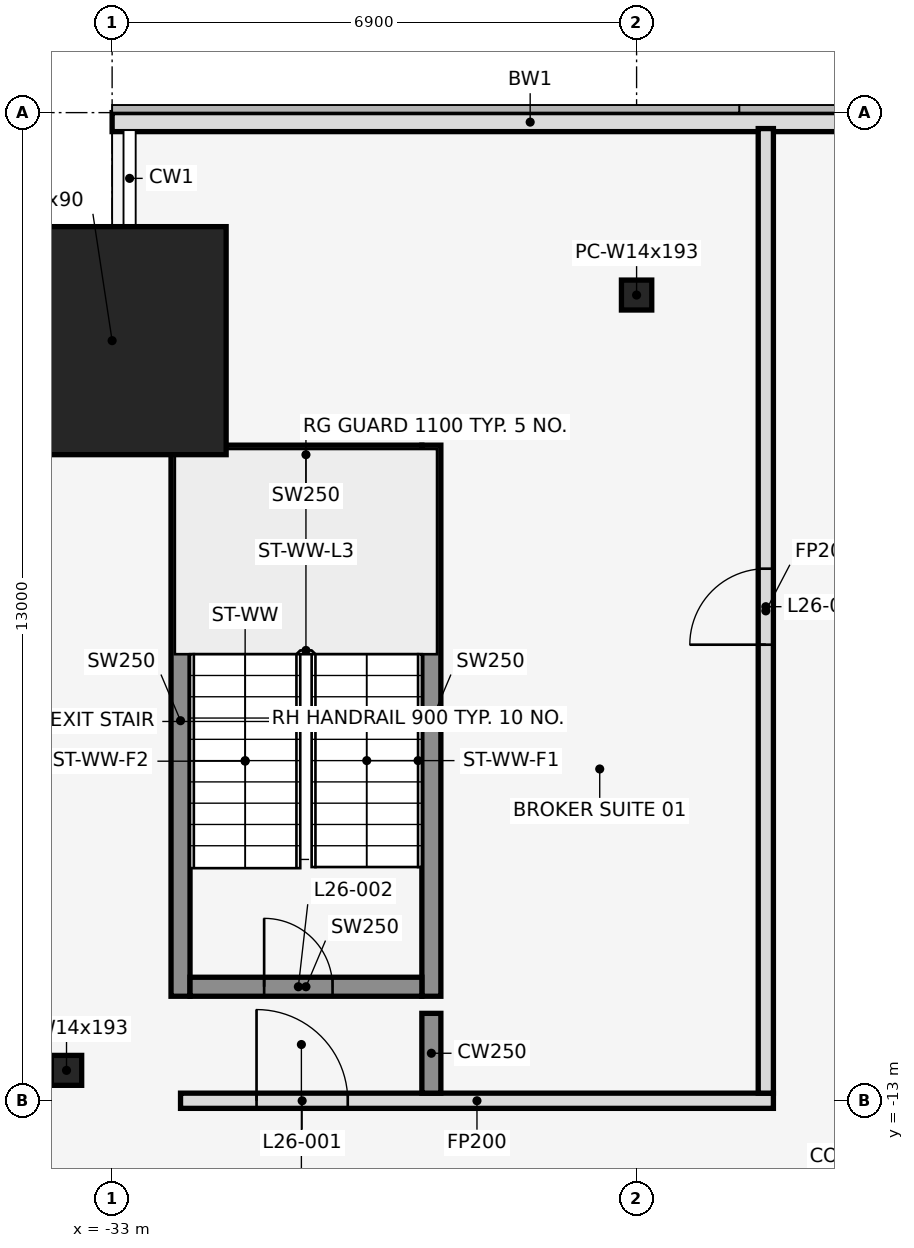
"""IFC4 building model, lengths in metres.
Left out: names, types, materials, properties, quantities, classifications, styles, units other than length and angle.
Written with IfcOpenShell. Run it as: python <this file> out.ifc"""

import sys

from ifc_helpers import new_model, si_unit, direction, frame, frame_2d, origin, origin_2d, place, context, subcontext, project, spatial, rectangle, hollow_rectangle, i_section, extrude, element, fill, save


model = new_model("IFC4")
c1 = context("Model", 3, precision=1e-05, world=origin(), true_north=direction((0.0, 1.0)))
c2 = subcontext(c1, "Body", "Model", "MODEL_VIEW")
j1 = project(units=[si_unit("LENGTHUNIT", "METRE"), si_unit("PLANEANGLEUNIT", "RADIAN")], contexts=[c1])
p1 = place(None, origin())
s1 = spatial("IfcSite", under=j1, at=p1, CompositionType="ELEMENT")
p2 = place(p1, origin())
s2 = spatial("IfcBuilding", under=s1, at=p2, CompositionType="ELEMENT")
p3 = place(p2, frame((0.0, 0.0, 122.7)))
s3 = spatial("IfcBuildingStorey", under=s2, at=p3, CompositionType="ELEMENT", Elevation=122.7)
p4 = place(p3, frame((-33.0, -3.0, 0.0), z_axis=(0.0, 0.0, 1.0), x_axis=(1.0, 0.0, 0.0)))
e1 = element("IfcColumn", 1, at=p4, inside=s3, PredefinedType="COLUMN", context=c2, shape_type="SweptSolid", body=[
    extrude(hollow_rectangle(XDim=3.0, YDim=3.0, WallThickness=0.09, at=origin_2d()), origin(), (0.0, 0.0, 1.0), 4.1),
])
for number, where, z_axis, x_axis in (
    (2, (-26.1, -2.4, 0.0), (0.0, 0.0, 1.0), (1.0, 0.0, 0.0)),
    (3, (-33.6, -12.6, 0.0), (0.0, 0.0, 1.0), (1.0, 0.0, 0.0)),
):
    element("IfcColumn", number, at=place(p3, frame(where, z_axis=z_axis, x_axis=x_axis)), inside=s3, PredefinedType="COLUMN", context=c2, shape_type="SweptSolid", body=[
        extrude(i_section(OverallWidth=0.399, OverallDepth=0.394, WebThickness=0.023, FlangeThickness=0.037, at=origin_2d()), origin(), (0.0, 0.0, 1.0), 4.1),
    ])
p5 = place(p3, frame((-22.0, -0.125, 0.0), z_axis=(0.0, 0.0, 1.0), x_axis=(-1.0, 0.0, 0.0)))
e4 = element("IfcWall", 4, at=p5, inside=s3, PredefinedType="STANDARD", context=c2, shape_type="SweptSolid", body=[
    extrude(rectangle(XDim=11.0, YDim=0.25, at=frame_2d((5.5, 0.0))), origin(), (0.0, 0.0, 1.0), 3.95),
])
for number, where, z_axis, x_axis in (
    (5, (-32.1, -11.625, 0.0), (0.0, 0.0, 1.0), (0.0, 1.0, 0.0)),
    (6, (-28.8, -11.625, 0.0), (0.0, 0.0, 1.0), (0.0, 1.0, 0.0)),
):
    element("IfcWall", number, at=place(p3, frame(where, z_axis=z_axis, x_axis=x_axis)), inside=s3, PredefinedType="SHEAR", context=c2, shape_type="SweptSolid", body=[
        extrude(rectangle(XDim=7.25, YDim=0.25, at=frame_2d((3.625, 0.0))), origin(), (0.0, 0.0, 1.0), 4.1),
    ])
p6 = place(p3, frame((-31.975, -11.5, 0.0), z_axis=(0.0, 0.0, 1.0), x_axis=(1.0, 0.0, 0.0)))
e7 = element("IfcWall", 7, at=p6, inside=s3, PredefinedType="SHEAR", context=c2, shape_type="SweptSolid", body=[
    extrude(rectangle(XDim=3.05, YDim=0.25, at=frame_2d((1.525, 0.0))), origin(), (0.0, 0.0, 1.0), 4.1),
])
p7 = place(p6, frame((0.975, 0.0, 0.0)))
e8 = element("IfcOpeningElement", 8, at=p7, cuts=e7, PredefinedType="OPENING", context=c2, shape_type="SweptSolid", body=[
    extrude(rectangle(XDim=0.9, YDim=2.1, at=frame_2d((0.45, 1.05))), frame((0.0, 0.137, 0.0), z_axis=(0.0, -1.0, 0.0), x_axis=(1.0, 0.0, 0.0)), (0.0, 0.0, 1.0), 0.274),
])
p8 = place(p3, frame((-31.975, -4.5, 0.0), z_axis=(0.0, 0.0, 1.0), x_axis=(1.0, 0.0, 0.0)))
e9 = element("IfcWall", 9, at=p8, inside=s3, PredefinedType="SHEAR", context=c2, shape_type="SweptSolid", body=[
    extrude(rectangle(XDim=3.05, YDim=0.25, at=frame_2d((1.525, 0.0))), origin(), (0.0, 0.0, 1.0), 4.1),
])
p9 = place(p3, frame((-32.1, -13.0, 0.0), z_axis=(0.0, 0.0, 1.0), x_axis=(1.0, 0.0, 0.0)))
e10 = element("IfcWall", 10, at=p9, inside=s3, PredefinedType="PARTITIONING", context=c2, shape_type="SweptSolid", body=[
    extrude(rectangle(XDim=7.8, YDim=0.2, at=frame_2d((3.9, 0.0))), origin(), (0.0, 0.0, 1.0), 3.018),
])
p10 = place(p9, frame((1.0, 0.0, 0.0)))
e11 = element("IfcOpeningElement", 11, at=p10, cuts=e10, PredefinedType="OPENING", context=c2, shape_type="SweptSolid", body=[
    extrude(rectangle(XDim=1.2, YDim=2.1, at=frame_2d((0.6, 1.05))), frame((0.0, 0.112, 0.0), z_axis=(0.0, -1.0, 0.0), x_axis=(1.0, 0.0, 0.0)), (0.0, 0.0, 1.0), 0.224),
])
p11 = place(p3, frame((-28.8, -12.9, 0.0), z_axis=(0.0, 0.0, 1.0), x_axis=(0.0, 1.0, 0.0)))
e12 = element("IfcWall", 12, at=p11, inside=s3, PredefinedType="SHEAR", context=c2, shape_type="SweptSolid", body=[
    extrude(rectangle(XDim=1.05, YDim=0.25, at=frame_2d((0.525, 0.0))), origin(), (0.0, 0.0, 1.0), 4.1),
])
p12 = place(p3, frame((-24.4, -12.9, 0.0), z_axis=(0.0, 0.0, 1.0), x_axis=(0.0, 1.0, 0.0)))
e13 = element("IfcWall", 13, at=p12, inside=s3, PredefinedType="PARTITIONING", context=c2, shape_type="SweptSolid", body=[
    extrude(rectangle(XDim=12.69, YDim=0.2, at=frame_2d((6.345, 0.0))), origin(), (0.0, 0.0, 1.0), 3.018),
])
p13 = place(p12, frame((5.9, 0.0, 0.0)))
e14 = element("IfcOpeningElement", 14, at=p13, cuts=e13, PredefinedType="OPENING", context=c2, shape_type="SweptSolid", body=[
    extrude(rectangle(XDim=1.0, YDim=2.1, at=frame_2d((0.5, 1.05))), frame((0.0, 0.112, 0.0), z_axis=(0.0, -1.0, 0.0), x_axis=(1.0, 0.0, 0.0)), (0.0, 0.0, 1.0), 0.224),
])
p14 = place(p10, origin())
e15 = element("IfcDoor", 15, at=p14, inside=s3, OperationType="SINGLE_SWING_LEFT", PredefinedType="DOOR", context=c2, shape_type="SweptSolid", body=[
    extrude(rectangle(XDim=1.2, YDim=2.1, at=frame_2d((0.6, 1.05))), frame((0.0, 0.025, 0.0), z_axis=(0.0, -1.0, 0.0), x_axis=(1.0, 0.0, 0.0)), (0.0, 0.0, 1.0), 0.05),
])
fill(e11, e15)
p15 = place(p7, origin())
e16 = element("IfcDoor", 16, at=p15, inside=s3, OperationType="SINGLE_SWING_LEFT", PredefinedType="DOOR", context=c2, shape_type="SweptSolid", body=[
    extrude(rectangle(XDim=0.9, YDim=2.1, at=frame_2d((0.45, 1.05))), frame((0.0, 0.025, 0.0), z_axis=(0.0, -1.0, 0.0), x_axis=(1.0, 0.0, 0.0)), (0.0, 0.0, 1.0), 0.05),
])
fill(e8, e16)
p16 = place(p13, origin())
e17 = element("IfcDoor", 17, at=p16, inside=s3, OperationType="SINGLE_SWING_LEFT", PredefinedType="DOOR", context=c2, shape_type="SweptSolid", body=[
    extrude(rectangle(XDim=1.0, YDim=2.1, at=frame_2d((0.5, 1.05))), frame((0.0, 0.025, 0.0), z_axis=(0.0, -1.0, 0.0), x_axis=(1.0, 0.0, 0.0)), (0.0, 0.0, 1.0), 0.05),
])
fill(e14, e17)
save(model, sys.argv[1])
